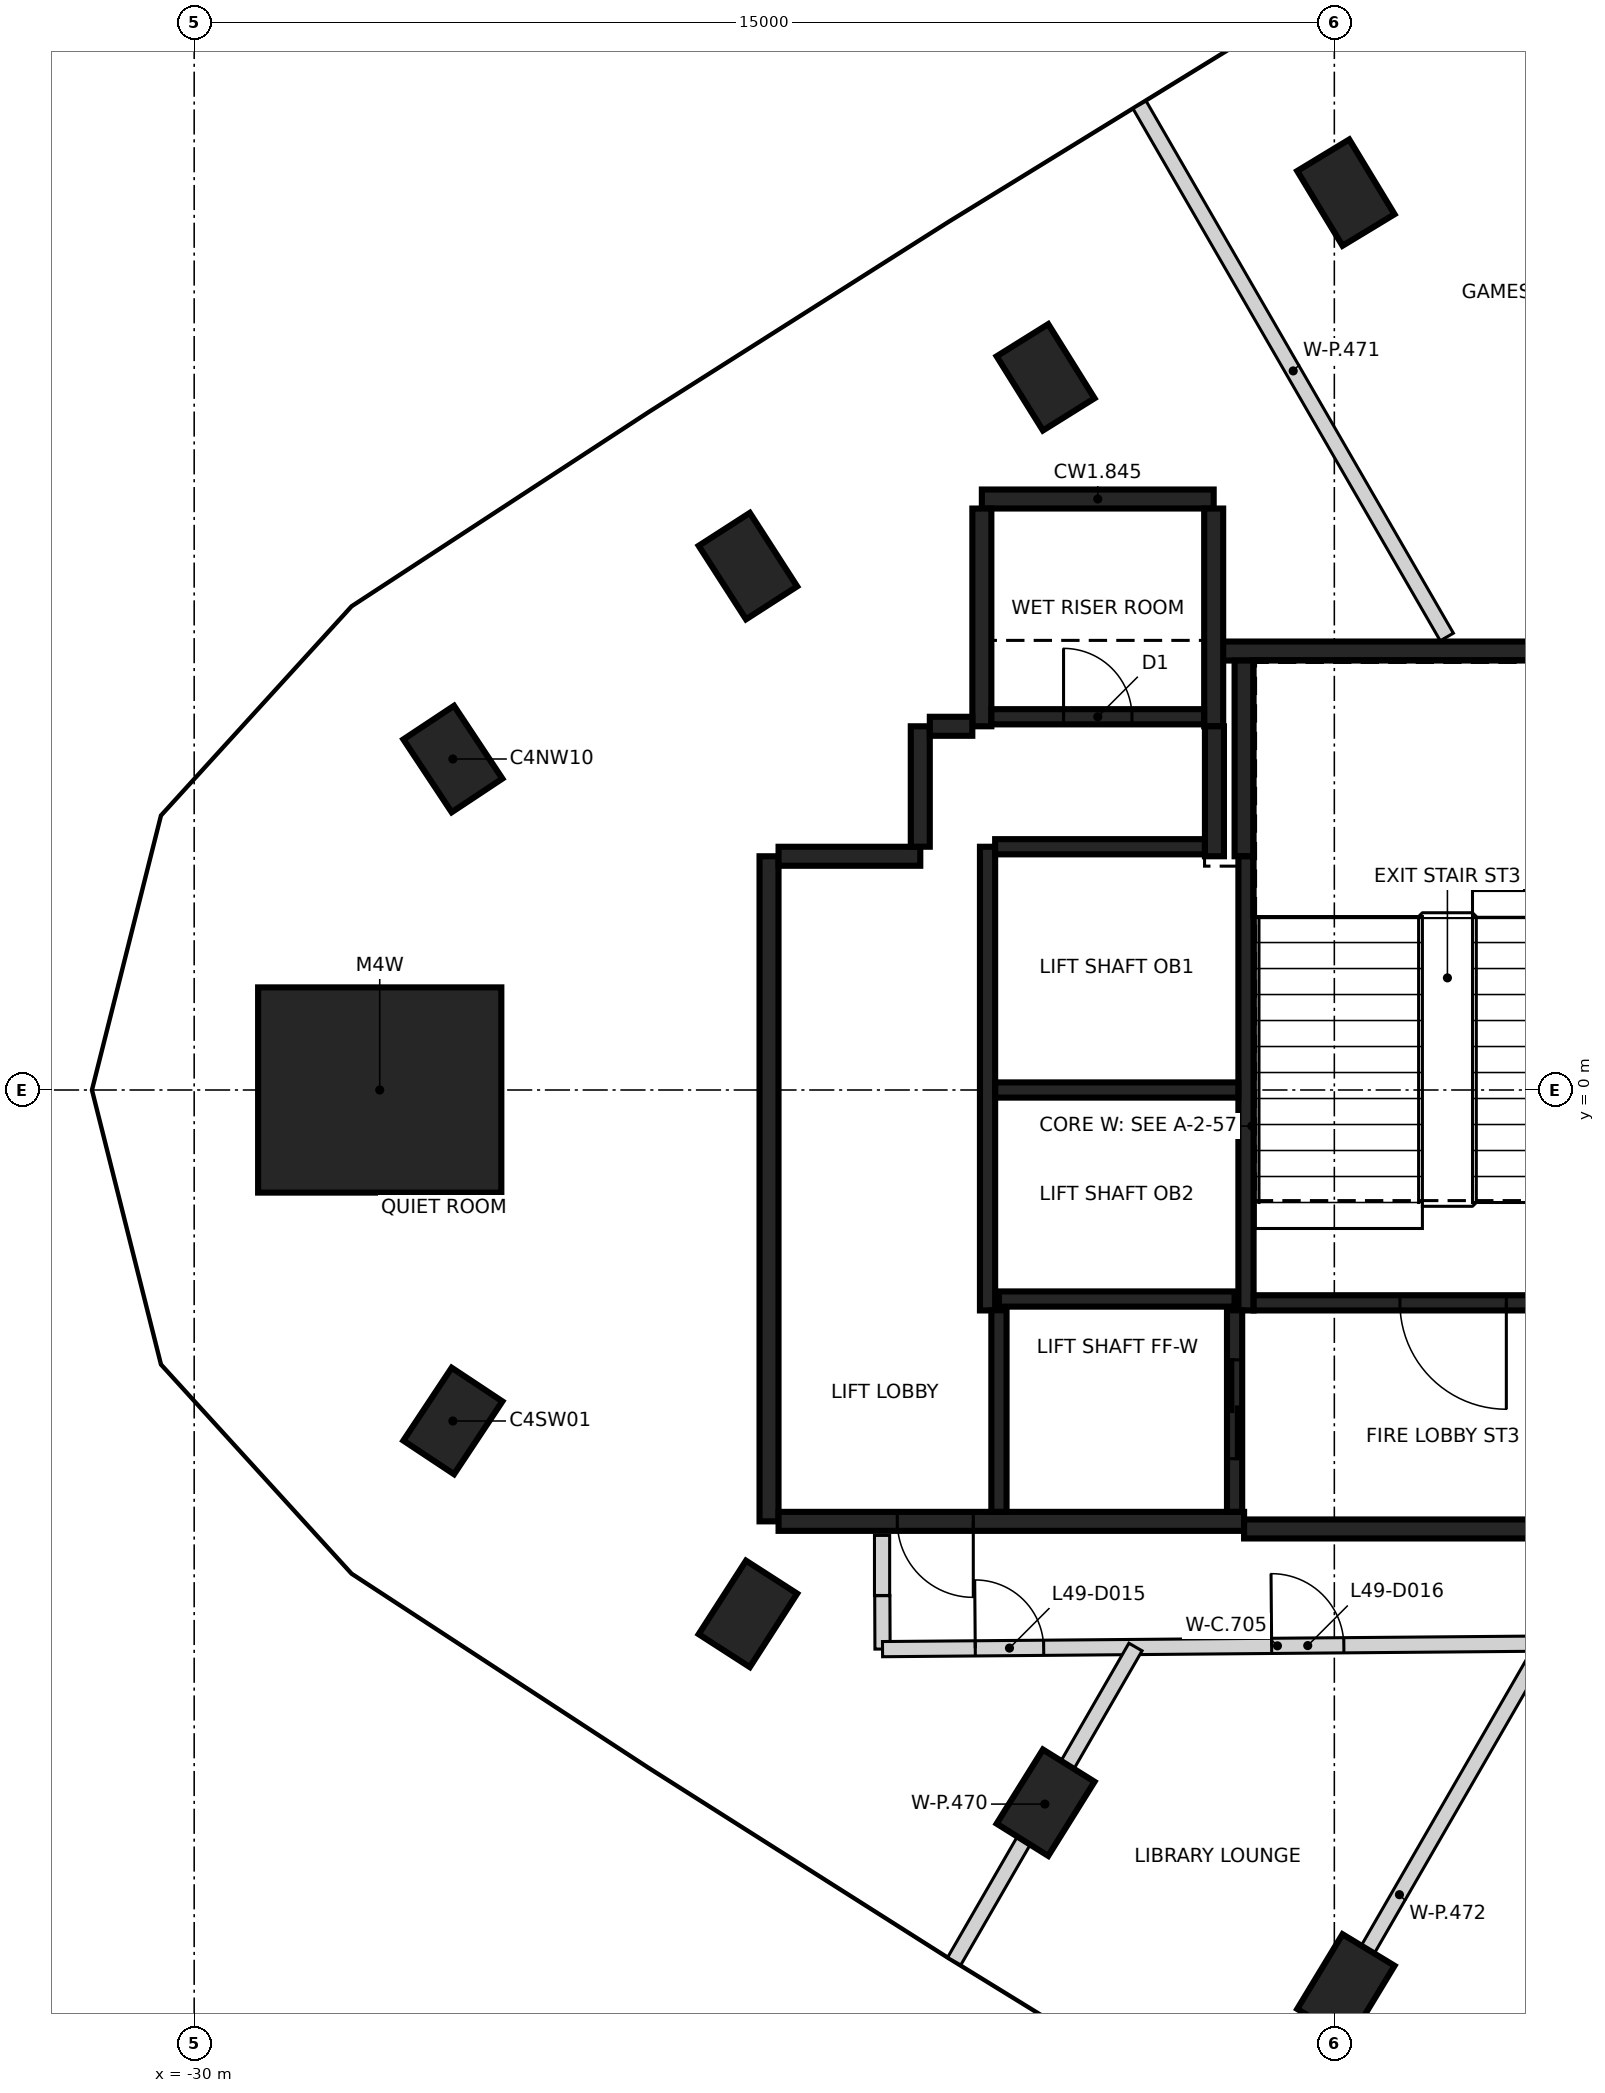
"""IFC4 building model, lengths in metres.
Left out: names, types, materials, properties, quantities, classifications, styles, units other than length and angle.
Written with IfcOpenShell. Run it as: python <this file> out.ifc"""

import sys

from ifc_helpers import new_model, si_unit, direction, frame, frame_2d, origin, origin_2d, place, context, subcontext, project, spatial, rectangle, extrude, element, fill, save


model = new_model("IFC4")
c1 = context("Model", 3, precision=1e-05, world=origin(), true_north=direction((0.0, 1.0)))
c2 = subcontext(c1, "Body", "Model", "MODEL_VIEW")
j1 = project(units=[si_unit("LENGTHUNIT", "METRE"), si_unit("PLANEANGLEUNIT", "RADIAN")], contexts=[c1])
p1 = place(None, origin())
s1 = spatial("IfcSite", under=j1, at=p1, CompositionType="ELEMENT")
p2 = place(p1, origin())
s2 = spatial("IfcBuilding", under=s1, at=p2, CompositionType="ELEMENT")
p3 = place(p2, frame((0.0, 0.0, 197.2)))
s3 = spatial("IfcBuildingStorey", under=s2, at=p3, CompositionType="ELEMENT", Elevation=197.2)
for number, where, z_axis, x_axis in (
    (1, (-14.848, 11.806, -0.35), (0.0, 0.0, 1.0), (-0.518, 0.855, 0.0)),
    (2, (-18.799, 9.376, -0.35), (0.0, 0.0, 1.0), (-0.529, 0.848, 0.0)),
    (3, (-22.715, 6.892, -0.35), (0.0, 0.0, 1.0), (-0.541, 0.841, 0.0)),
    (4, (-26.597, 4.354, -0.35), (0.0, 0.0, 1.0), (-0.553, 0.833, 0.0)),
    (5, (-26.597, -4.354, -0.35), (0.0, 0.0, 1.0), (0.553, 0.833, 0.0)),
    (6, (-22.715, -6.892, -0.35), (0.0, 0.0, 1.0), (0.541, 0.841, 0.0)),
    (7, (-18.799, -9.376, -0.35), (0.0, 0.0, 1.0), (0.529, 0.848, 0.0)),
    (8, (-14.848, -11.806, -0.35), (0.0, 0.0, 1.0), (0.518, 0.855, 0.0)),
):
    element("IfcColumn", number, at=place(p3, frame(where, z_axis=z_axis, x_axis=x_axis)), inside=s3, PredefinedType="COLUMN", context=c2, shape_type="SweptSolid", body=[
        extrude(rectangle(XDim=1.15, YDim=0.8, at=origin_2d()), origin(), (0.0, 0.0, 1.0), 3.6),
    ])
p4 = place(p3, frame((-27.559, 0.0, -0.35), z_axis=(0.0, 0.0, 1.0), x_axis=(1.0, 0.0, 0.0)))
e9 = element("IfcColumn", 9, at=p4, inside=s3, PredefinedType="COLUMN", context=c2, shape_type="SweptSolid", body=[
    extrude(rectangle(XDim=3.2, YDim=2.7, at=origin_2d()), origin(), (0.0, 0.0, 1.0), 3.6),
])
p5 = place(p3, frame((-22.437, -5.675, 0.0), z_axis=(0.0, 0.0, 1.0), x_axis=(0.0, 1.0, 0.0)))
e10 = element("IfcWall", 10, at=p5, inside=s3, PredefinedType="SHEAR", context=c2, shape_type="SweptSolid", body=[
    extrude(rectangle(XDim=8.75, YDim=0.25, at=frame_2d((4.375, 0.0))), origin(), (0.0, 0.0, 1.0), 3.25),
])
p6 = place(p3, frame((-16.187, -5.675, 0.0), z_axis=(0.0, 0.0, 1.0), x_axis=(-1.0, 0.0, 0.0)))
e11 = element("IfcWall", 11, at=p6, inside=s3, PredefinedType="SHEAR", context=c2, shape_type="SweptSolid", body=[
    extrude(rectangle(XDim=6.125, YDim=0.25, at=frame_2d((3.062, 0.0))), origin(), (0.0, 0.0, 1.0), 3.25),
])
p7 = place(p6, frame((3.563, 0.0, 0.0)))
e12 = element("IfcOpeningElement", 12, at=p7, cuts=e11, PredefinedType="OPENING", context=c2, shape_type="SweptSolid", body=[
    extrude(rectangle(XDim=1.0, YDim=2.1, at=frame_2d((0.5, 1.05))), frame((0.0, 0.135, 0.0), z_axis=(0.0, -1.0, 0.0), x_axis=(1.0, 0.0, 0.0)), (0.0, 0.0, 1.0), 0.27),
])
p8 = place(p3, frame((-10.963, -5.775, 0.0), z_axis=(0.0, 0.0, 1.0), x_axis=(-1.0, 0.0, 0.0)))
e13 = element("IfcWall", 13, at=p8, inside=s3, PredefinedType="SHEAR", context=c2, shape_type="SweptSolid", body=[
    extrude(rectangle(XDim=5.225, YDim=0.25, at=frame_2d((2.612, 0.0))), origin(), (0.0, 0.0, 1.0), 3.25),
])
p9 = place(p3, frame((-16.472, 5.775, 0.0), z_axis=(0.0, 0.0, 1.0), x_axis=(1.0, 0.0, 0.0)))
e14 = element("IfcWall", 14, at=p9, inside=s3, PredefinedType="SHEAR", context=c2, shape_type="SweptSolid", body=[
    extrude(rectangle(XDim=5.51, YDim=0.25, at=frame_2d((2.755, 0.0))), origin(), (0.0, 0.0, 1.0), 3.25),
])
p10 = place(p3, frame((-19.637, 7.775, 0.0), z_axis=(0.0, 0.0, 1.0), x_axis=(1.0, 0.0, 0.0)))
e15 = element("IfcWall", 15, at=p10, inside=s3, PredefinedType="SHEAR", context=c2, shape_type="SweptSolid", body=[
    extrude(rectangle(XDim=3.05, YDim=0.25, at=frame_2d((1.525, 0.0))), origin(), (0.0, 0.0, 1.0), 3.25),
])
for number, where, z_axis, x_axis in (
    (16, (-16.587, 7.65, 0.0), (0.0, 0.0, 1.0), (0.0, -1.0, 0.0)),
    (17, (-19.637, 4.785, 0.0), (0.0, 0.0, 1.0), (0.0, 1.0, 0.0)),
):
    element("IfcWall", number, at=place(p3, frame(where, z_axis=z_axis, x_axis=x_axis)), inside=s3, PredefinedType="SHEAR", context=c2, shape_type="SweptSolid", body=[
        extrude(rectangle(XDim=2.865, YDim=0.25, at=frame_2d((1.432, 0.0))), origin(), (0.0, 0.0, 1.0), 3.25),
    ])
p11 = place(p3, frame((-16.187, 3.075, 0.0), z_axis=(0.0, 0.0, 1.0), x_axis=(0.0, 1.0, 0.0)))
e18 = element("IfcWall", 18, at=p11, inside=s3, PredefinedType="SHEAR", context=c2, shape_type="SweptSolid", body=[
    extrude(rectangle(XDim=2.575, YDim=0.25, at=frame_2d((1.287, 0.0))), origin(), (0.0, 0.0, 1.0), 3.25),
])
p12 = place(p3, frame((-22.312, 3.075, 0.0), z_axis=(0.0, 0.0, 1.0), x_axis=(1.0, 0.0, 0.0)))
e19 = element("IfcWall", 19, at=p12, inside=s3, PredefinedType="SHEAR", context=c2, shape_type="SweptSolid", body=[
    extrude(rectangle(XDim=1.865, YDim=0.25, at=frame_2d((0.932, 0.0))), origin(), (0.0, 0.0, 1.0), 3.25),
])
p13 = place(p3, frame((-16.577, 4.785, 0.0), z_axis=(0.0, 0.0, 1.0), x_axis=(0.0, -1.0, 0.0)))
e20 = element("IfcWall", 20, at=p13, inside=s3, PredefinedType="SHEAR", context=c2, shape_type="SweptSolid", body=[
    extrude(rectangle(XDim=1.71, YDim=0.25, at=frame_2d((0.855, 0.0))), origin(), (0.0, 0.0, 1.0), 3.25),
])
p14 = place(p3, frame((-20.447, 3.2, 0.0), z_axis=(0.0, 0.0, 1.0), x_axis=(0.0, 1.0, 0.0)))
e21 = element("IfcWall", 21, at=p14, inside=s3, PredefinedType="SHEAR", context=c2, shape_type="SweptSolid", body=[
    extrude(rectangle(XDim=1.584, YDim=0.25, at=frame_2d((0.792, 0.0))), origin(), (0.0, 0.0, 1.0), 3.25),
])
p15 = place(p3, frame((-20.322, 4.785, 0.0), z_axis=(0.0, 0.0, 1.0), x_axis=(1.0, 0.0, 0.0)))
e22 = element("IfcWall", 22, at=p15, inside=s3, PredefinedType="SHEAR", context=c2, shape_type="SweptSolid", body=[
    extrude(rectangle(XDim=0.559, YDim=0.25, at=frame_2d((0.28, 0.0))), origin(), (0.0, 0.0, 1.0), 3.25),
])
p16 = place(p3, frame((-16.162, 3.074, 0.0), z_axis=(0.0, 0.0, 1.0), x_axis=(0.0, -1.0, 0.0)))
e23 = element("IfcWall", 23, at=p16, inside=s3, PredefinedType="SHEAR", context=c2, shape_type="SweptSolid", body=[
    extrude(rectangle(XDim=5.974, YDim=0.2, at=frame_2d((2.987, 0.0))), origin(), (0.0, 0.0, 1.0), 3.25),
])
p17 = place(p3, frame((-19.562, -2.9, 0.0), z_axis=(0.0, 0.0, 1.0), x_axis=(0.0, 1.0, 0.0)))
e24 = element("IfcWall", 24, at=p17, inside=s3, PredefinedType="SHEAR", context=c2, shape_type="SweptSolid", body=[
    extrude(rectangle(XDim=6.1, YDim=0.2, at=frame_2d((3.05, 0.0))), origin(), (0.0, 0.0, 1.0), 3.25),
])
p18 = place(p3, frame((-10.963, -2.8, 0.0), z_axis=(0.0, 0.0, 1.0), x_axis=(-1.0, 0.0, 0.0)))
e25 = element("IfcWall", 25, at=p18, inside=s3, PredefinedType="SHEAR", context=c2, shape_type="SweptSolid", body=[
    extrude(rectangle(XDim=5.098, YDim=0.2, at=frame_2d((2.549, 0.0))), origin(), (0.0, 0.0, 1.0), 3.25),
])
p19 = place(p18, frame((1.774, 0.0, 0.0)))
e26 = element("IfcOpeningElement", 26, at=p19, cuts=e25, PredefinedType="OPENING", context=c2, shape_type="SweptSolid", body=[
    extrude(rectangle(XDim=1.4, YDim=2.1, at=frame_2d((0.7, 1.05))), frame((0.0, 0.11, 0.0), z_axis=(0.0, -1.0, 0.0), x_axis=(1.0, 0.0, 0.0)), (0.0, 0.0, 1.0), 0.22),
])
p20 = place(p3, frame((-16.263, 0.0, 0.0), z_axis=(0.0, 0.0, 1.0), x_axis=(-1.0, 0.0, 0.0)))
e27 = element("IfcWall", 27, at=p20, inside=s3, PredefinedType="SHEAR", context=c2, shape_type="SweptSolid", body=[
    extrude(rectangle(XDim=3.198, YDim=0.2, at=frame_2d((1.599, 0.0))), origin(), (0.0, 0.0, 1.0), 3.25),
])
p21 = place(p3, frame((-19.511, 4.91, 0.0), z_axis=(0.0, 0.0, 1.0), x_axis=(1.0, 0.0, 0.0)))
e28 = element("IfcWall", 28, at=p21, inside=s3, PredefinedType="SHEAR", context=c2, shape_type="SweptSolid", body=[
    extrude(rectangle(XDim=2.798, YDim=0.2, at=frame_2d((1.399, 0.0))), origin(), (0.0, 0.0, 1.0), 3.25),
])
p22 = place(p21, frame((0.949, 0.0, 0.0)))
e29 = element("IfcOpeningElement", 29, at=p22, cuts=e28, PredefinedType="OPENING", context=c2, shape_type="SweptSolid", body=[
    extrude(rectangle(XDim=0.9, YDim=2.1, at=frame_2d((0.45, 1.05))), frame((0.0, 0.11, 0.0), z_axis=(0.0, -1.0, 0.0), x_axis=(1.0, 0.0, 0.0)), (0.0, 0.0, 1.0), 0.22),
])
p23 = place(p3, frame((-19.462, 3.2, 0.0), z_axis=(0.0, 0.0, 1.0), x_axis=(1.0, 0.0, 0.0)))
e30 = element("IfcWall", 30, at=p23, inside=s3, PredefinedType="SHEAR", context=c2, shape_type="SweptSolid", body=[
    extrude(rectangle(XDim=2.759, YDim=0.2, at=frame_2d((1.379, 0.0))), origin(), (0.0, 0.0, 1.0), 3.25),
])
p24 = place(p3, frame((-19.412, -2.75, 0.0), z_axis=(0.0, 0.0, 1.0), x_axis=(1.0, 0.0, 0.0)))
e31 = element("IfcWall", 31, at=p24, inside=s3, PredefinedType="SHEAR", context=c2, shape_type="SweptSolid", body=[
    extrude(rectangle(XDim=3.1, YDim=0.2, at=frame_2d((1.55, 0.0))), origin(), (0.0, 0.0, 1.0), 3.25),
])
p25 = place(p3, frame((-16.312, -2.898, 0.0), z_axis=(0.0, 0.0, 1.0), x_axis=(0.0, -1.0, 0.0)))
e32 = element("IfcWall", 32, at=p25, inside=s3, PredefinedType="SHEAR", context=c2, shape_type="SweptSolid", body=[
    extrude(rectangle(XDim=2.651, YDim=0.2, at=frame_2d((1.325, 0.0))), origin(), (0.0, 0.0, 1.0), 3.25),
])
p26 = place(p25, frame((0.652, 0.0, 0.0)))
e33 = element("IfcOpeningElement", 33, at=p26, cuts=e32, PredefinedType="OPENING", context=c2, shape_type="SweptSolid", body=[
    extrude(rectangle(XDim=1.3, YDim=2.1, at=frame_2d((0.65, 1.05))), frame((0.0, 0.11, 0.0), z_axis=(0.0, -1.0, 0.0), x_axis=(1.0, 0.0, 0.0)), (0.0, 0.0, 1.0), 0.22),
])
p27 = place(p3, frame((-19.412, -5.549, 0.0), z_axis=(0.0, 0.0, 1.0), x_axis=(0.0, 1.0, 0.0)))
e34 = element("IfcWall", 34, at=p27, inside=s3, PredefinedType="SHEAR", context=c2, shape_type="SweptSolid", body=[
    extrude(rectangle(XDim=2.651, YDim=0.2, at=frame_2d((1.325, 0.0))), origin(), (0.0, 0.0, 1.0), 3.25),
])
p28 = place(p3, frame((-20.95, -6.65, 0.0), z_axis=(0.0, 0.0, 1.0), x_axis=(0.0, 1.0, 0.0)))
e35 = element("IfcWall", 35, at=p28, inside=s3, PredefinedType="PARTITIONING", context=c2, shape_type="SweptSolid", body=[
    extrude(rectangle(XDim=0.79, YDim=0.2, at=frame_2d((0.395, 0.0))), origin(), (0.0, 0.0, 1.0), 3.25),
])
p29 = place(p3, frame((-20.947, -6.653, 0.0), z_axis=(0.0, 0.0, 1.0), x_axis=(0.004173876686, -0.999991289339, 0.0)))
e36 = element("IfcWall", 36, at=p29, inside=s3, PredefinedType="PARTITIONING", context=c2, shape_type="SweptSolid", body=[
    extrude(rectangle(XDim=0.702, YDim=0.2, at=frame_2d((0.351, 0.0))), origin(), (0.0, 0.0, 1.0), 3.25),
])
p30 = place(p3, frame((-20.944, -7.356, 0.0), z_axis=(0.0, 0.0, 1.0), x_axis=(0.999964824566, 0.00838746869, 0.0)))
e37 = element("IfcWall", 37, at=p30, inside=s3, PredefinedType="PARTITIONING", context=c2, shape_type="SweptSolid", body=[
    extrude(rectangle(XDim=10.391, YDim=0.2, at=frame_2d((5.196, 0.0))), origin(), (0.0, 0.0, 1.0), 3.25),
])
p31 = place(p30, frame((1.22, 0.0, 0.0)))
e38 = element("IfcOpeningElement", 38, at=p31, cuts=e37, PredefinedType="OPENING", context=c2, shape_type="SweptSolid", body=[
    extrude(rectangle(XDim=0.9, YDim=2.1, at=frame_2d((0.45, 1.05))), frame((0.0, 0.11, 0.0), z_axis=(0.0, -1.0, 0.0), x_axis=(1.0, 0.0, 0.0)), (0.0, 0.0, 1.0), 0.22),
])
p32 = place(p30, frame((5.119, 0.0, 0.0)))
e39 = element("IfcOpeningElement", 39, at=p32, cuts=e37, PredefinedType="OPENING", context=c2, shape_type="SweptSolid", body=[
    extrude(rectangle(XDim=0.95, YDim=2.1, at=frame_2d((0.475, 1.05))), frame((0.0, 0.11, 0.0), z_axis=(0.0, -1.0, 0.0), x_axis=(1.0, 0.0, 0.0)), (0.0, 0.0, 1.0), 0.22),
])
p33 = place(p3, frame((-20.001, -11.461, 0.0), z_axis=(0.0, 0.0, 1.0), x_axis=(0.499749027893, 0.866170254119, 0.0)))
e40 = element("IfcWall", 40, at=p33, inside=s3, PredefinedType="PARTITIONING", context=c2, shape_type="SweptSolid", body=[
    extrude(rectangle(XDim=4.772, YDim=0.2, at=frame_2d((2.386, 0.0))), origin(), (0.0, 0.0, 1.0), 3.25),
])
p34 = place(p3, frame((-17.562, 12.961, 0.0), z_axis=(0.0, 0.0, 1.0), x_axis=(0.500056194816, -0.865992957262, 0.0)))
e41 = element("IfcWall", 41, at=p34, inside=s3, PredefinedType="PARTITIONING", context=c2, shape_type="SweptSolid", body=[
    extrude(rectangle(XDim=8.084, YDim=0.2, at=frame_2d((4.042, 0.0))), origin(), (0.0, 0.0, 1.0), 2.35),
])
p35 = place(p3, frame((-16.05, -13.89, 0.0), z_axis=(0.0, 0.0, 1.0), x_axis=(0.499849898665, 0.866112047488, 0.0)))
e42 = element("IfcWall", 42, at=p35, inside=s3, PredefinedType="PARTITIONING", context=c2, shape_type="SweptSolid", body=[
    extrude(rectangle(XDim=7.628, YDim=0.2, at=frame_2d((3.814, 0.0))), origin(), (0.0, 0.0, 1.0), 3.25),
])
p36 = place(p26, origin())
e43 = element("IfcDoor", 43, at=p36, inside=s3, OperationType="SLIDING_TO_RIGHT", PredefinedType="DOOR", context=c2, shape_type="SweptSolid", body=[
    extrude(rectangle(XDim=1.3, YDim=2.1, at=frame_2d((0.65, 1.05))), frame((0.0, 0.025, 0.0), z_axis=(0.0, -1.0, 0.0), x_axis=(1.0, 0.0, 0.0)), (0.0, 0.0, 1.0), 0.05),
])
fill(e33, e43)
p37 = place(p7, origin())
e44 = element("IfcDoor", 44, at=p37, inside=s3, OperationType="SINGLE_SWING_LEFT", PredefinedType="DOOR", context=c2, shape_type="SweptSolid", body=[
    extrude(rectangle(XDim=1.0, YDim=2.1, at=frame_2d((0.5, 1.05))), frame((0.0, 0.025, 0.0), z_axis=(0.0, -1.0, 0.0), x_axis=(1.0, 0.0, 0.0)), (0.0, 0.0, 1.0), 0.05),
])
fill(e12, e44)
p38 = place(p19, origin())
e45 = element("IfcDoor", 45, at=p38, inside=s3, OperationType="SINGLE_SWING_RIGHT", PredefinedType="DOOR", context=c2, shape_type="SweptSolid", body=[
    extrude(rectangle(XDim=1.4, YDim=2.1, at=frame_2d((0.7, 1.05))), frame((0.0, 0.025, 0.0), z_axis=(0.0, -1.0, 0.0), x_axis=(1.0, 0.0, 0.0)), (0.0, 0.0, 1.0), 0.05),
])
fill(e26, e45)
p39 = place(p22, origin())
e46 = element("IfcDoor", 46, at=p39, inside=s3, OperationType="SINGLE_SWING_LEFT", PredefinedType="DOOR", context=c2, shape_type="SweptSolid", body=[
    extrude(rectangle(XDim=0.9, YDim=2.1, at=frame_2d((0.45, 1.05))), frame((0.0, 0.025, 0.0), z_axis=(0.0, -1.0, 0.0), x_axis=(1.0, 0.0, 0.0)), (0.0, 0.0, 1.0), 0.05),
])
fill(e29, e46)
p40 = place(p31, origin())
e47 = element("IfcDoor", 47, at=p40, inside=s3, OperationType="SINGLE_SWING_LEFT", PredefinedType="DOOR", context=c2, shape_type="SweptSolid", body=[
    extrude(rectangle(XDim=0.9, YDim=2.1, at=frame_2d((0.45, 1.05))), frame((0.0, 0.025, 0.0), z_axis=(0.0, -1.0, 0.0), x_axis=(1.0, 0.0, 0.0)), (0.0, 0.0, 1.0), 0.05),
])
fill(e38, e47)
p41 = place(p32, frame((0.95, 0.0, 0.0), z_axis=(0.0, 0.0, 1.0), x_axis=(-1.0, 0.0, 0.0)))
e48 = element("IfcDoor", 48, at=p41, inside=s3, OperationType="SINGLE_SWING_LEFT", PredefinedType="DOOR", context=c2, shape_type="SweptSolid", body=[
    extrude(rectangle(XDim=0.95, YDim=2.1, at=frame_2d((0.475, 1.05))), frame((0.0, 0.025, 0.0), z_axis=(0.0, -1.0, 0.0), x_axis=(1.0, 0.0, 0.0)), (0.0, 0.0, 1.0), 0.05),
])
fill(e39, e48)
save(model, sys.argv[1])
